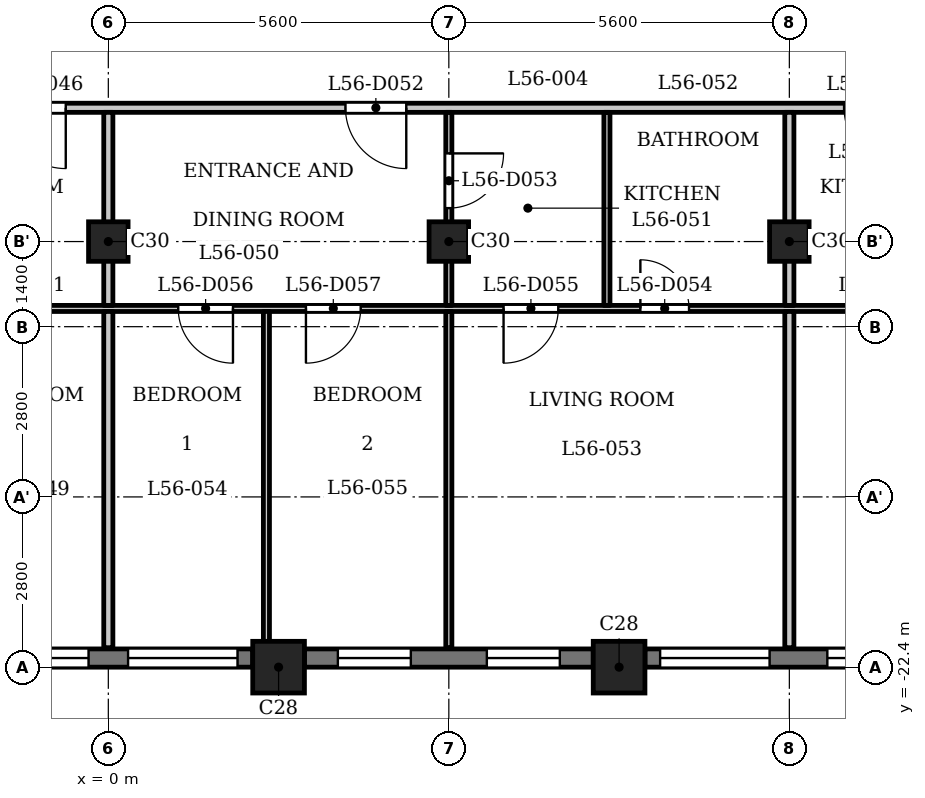
"""IFC4 building model, lengths in metres.
Left out: names, types, materials, properties, quantities, classifications, styles, units other than length and angle.
Written with IfcOpenShell. Run it as: python <this file> out.ifc"""

import sys

from ifc_helpers import new_model, si_unit, direction, frame, frame_2d, origin, origin_2d, place, context, subcontext, project, spatial, rectangle, extrude, element, fill, save


model = new_model("IFC4")
c1 = context("Model", 3, precision=1e-05, world=origin(), true_north=direction((0.0, 1.0)))
c2 = subcontext(c1, "Body", "Model", "MODEL_VIEW")
j1 = project(units=[si_unit("LENGTHUNIT", "METRE"), si_unit("PLANEANGLEUNIT", "RADIAN")], contexts=[c1])
p1 = place(None, origin())
s1 = spatial("IfcSite", under=j1, at=p1, CompositionType="ELEMENT")
p2 = place(p1, origin())
s2 = spatial("IfcBuilding", under=s1, at=p2, CompositionType="ELEMENT")
p3 = place(p2, frame((0.0, 0.0, 216.9)))
s3 = spatial("IfcBuildingStorey", under=s2, at=p3, CompositionType="ELEMENT", Elevation=216.9)
for number, where, z_axis, x_axis in (
    (1, (2.8, -22.4, 0.0), (0.0, 0.0, 1.0), (1.0, 0.0, 0.0)),
    (2, (8.4, -22.4, 0.0), (0.0, 0.0, 1.0), (1.0, 0.0, 0.0)),
):
    element("IfcColumn", number, at=place(p3, frame(where, z_axis=z_axis, x_axis=x_axis)), inside=s3, PredefinedType="COLUMN", context=c2, shape_type="SweptSolid", body=[
        extrude(rectangle(XDim=0.85, YDim=0.85, at=origin_2d()), origin(), (0.0, 0.0, 1.0), 3.5),
    ])
for number, where, z_axis, x_axis in (
    (3, (0.0, -15.4, 0.0), (0.0, 0.0, 1.0), (1.0, 0.0, 0.0)),
    (4, (5.6, -15.4, 0.0), (0.0, 0.0, 1.0), (1.0, 0.0, 0.0)),
    (5, (11.2, -15.4, 0.0), (0.0, 0.0, 1.0), (1.0, 0.0, 0.0)),
):
    element("IfcColumn", number, at=place(p3, frame(where, z_axis=z_axis, x_axis=x_axis)), inside=s3, PredefinedType="COLUMN", context=c2, shape_type="SweptSolid", body=[
        extrude(rectangle(XDim=0.65, YDim=0.65, at=origin_2d()), origin(), (0.0, 0.0, 1.0), 3.5),
    ])
p4 = place(p3, frame((-2.375, -22.25, 0.0), z_axis=(0.0, 0.0, 1.0), x_axis=(1.0, 0.0, 0.0)))
e6 = element("IfcWall", 6, at=p4, inside=s3, PredefinedType="SOLIDWALL", context=c2, shape_type="SweptSolid", body=[
    extrude(rectangle(XDim=4.75, YDim=0.3, at=frame_2d((2.375, 0.0))), origin(), (0.0, 0.0, 1.0), 2.5),
])
p5 = place(p4, frame((0.25, 0.0, 0.9)))
e7 = element("IfcOpeningElement", 7, at=p5, cuts=e6, PredefinedType="OPENING", context=c2, shape_type="SweptSolid", body=[
    extrude(rectangle(XDim=1.8, YDim=1.25, at=frame_2d((0.9, 0.625))), frame((0.0, 0.16, 0.0), z_axis=(0.0, -1.0, 0.0), x_axis=(1.0, 0.0, 0.0)), (0.0, 0.0, 1.0), 0.32),
])
p6 = place(p4, frame((2.7, 0.0, 0.9)))
e8 = element("IfcOpeningElement", 8, at=p6, cuts=e6, PredefinedType="OPENING", context=c2, shape_type="SweptSolid", body=[
    extrude(rectangle(XDim=1.8, YDim=1.25, at=frame_2d((0.9, 0.625))), frame((0.0, 0.16, 0.0), z_axis=(0.0, -1.0, 0.0), x_axis=(1.0, 0.0, 0.0)), (0.0, 0.0, 1.0), 0.32),
])
p7 = place(p3, frame((3.225, -22.25, 0.0), z_axis=(0.0, 0.0, 1.0), x_axis=(1.0, 0.0, 0.0)))
e9 = element("IfcWall", 9, at=p7, inside=s3, PredefinedType="SOLIDWALL", context=c2, shape_type="SweptSolid", body=[
    extrude(rectangle(XDim=4.75, YDim=0.3, at=frame_2d((2.375, 0.0))), origin(), (0.0, 0.0, 1.0), 2.5),
])
p8 = place(p7, frame((0.55, 0.0, 0.6)))
e10 = element("IfcOpeningElement", 10, at=p8, cuts=e9, PredefinedType="OPENING", context=c2, shape_type="SweptSolid", body=[
    extrude(rectangle(XDim=1.2, YDim=1.55, at=frame_2d((0.6, 0.775))), frame((0.0, 0.16, 0.0), z_axis=(0.0, -1.0, 0.0), x_axis=(1.0, 0.0, 0.0)), (0.0, 0.0, 1.0), 0.32),
])
p9 = place(p7, frame((3.0, 0.0, 0.6)))
e11 = element("IfcOpeningElement", 11, at=p9, cuts=e9, PredefinedType="OPENING", context=c2, shape_type="SweptSolid", body=[
    extrude(rectangle(XDim=1.2, YDim=1.55, at=frame_2d((0.6, 0.775))), frame((0.0, 0.16, 0.0), z_axis=(0.0, -1.0, 0.0), x_axis=(1.0, 0.0, 0.0)), (0.0, 0.0, 1.0), 0.32),
])
p10 = place(p3, frame((8.825, -22.25, 0.0), z_axis=(0.0, 0.0, 1.0), x_axis=(1.0, 0.0, 0.0)))
e12 = element("IfcWall", 12, at=p10, inside=s3, PredefinedType="SOLIDWALL", context=c2, shape_type="SweptSolid", body=[
    extrude(rectangle(XDim=4.75, YDim=0.3, at=frame_2d((2.375, 0.0))), origin(), (0.0, 0.0, 1.0), 2.5),
])
p11 = place(p10, frame((0.25, 0.0, 0.9)))
e13 = element("IfcOpeningElement", 13, at=p11, cuts=e12, PredefinedType="OPENING", context=c2, shape_type="SweptSolid", body=[
    extrude(rectangle(XDim=1.8, YDim=1.25, at=frame_2d((0.9, 0.625))), frame((0.0, 0.16, 0.0), z_axis=(0.0, -1.0, 0.0), x_axis=(1.0, 0.0, 0.0)), (0.0, 0.0, 1.0), 0.32),
])
p12 = place(p10, frame((3.0, 0.0, 0.6)))
e14 = element("IfcOpeningElement", 14, at=p12, cuts=e12, PredefinedType="OPENING", context=c2, shape_type="SweptSolid", body=[
    extrude(rectangle(XDim=1.2, YDim=1.55, at=frame_2d((0.6, 0.775))), frame((0.0, 0.16, 0.0), z_axis=(0.0, -1.0, 0.0), x_axis=(1.0, 0.0, 0.0)), (0.0, 0.0, 1.0), 0.32),
])
p13 = place(p3, frame((-16.725, -16.5, 0.0), z_axis=(0.0, 0.0, 1.0), x_axis=(1.0, 0.0, 0.0)))
e15 = element("IfcWall", 15, at=p13, inside=s3, PredefinedType="PARTITIONING", context=c2, shape_type="SweptSolid", body=[
    extrude(rectangle(XDim=33.45, YDim=0.1, at=frame_2d((16.725, 0.0))), origin(), (0.0, 0.0, 1.0), 3.2),
])
p14 = place(p13, frame((0.675, 0.0, 0.0)))
e16 = element("IfcOpeningElement", 16, at=p14, cuts=e15, PredefinedType="OPENING", context=c2, shape_type="SweptSolid", body=[
    extrude(rectangle(XDim=0.8, YDim=2.1, at=frame_2d((0.4, 1.05))), frame((0.0, 0.06, 0.0), z_axis=(0.0, -1.0, 0.0), x_axis=(1.0, 0.0, 0.0)), (0.0, 0.0, 1.0), 0.12),
])
p15 = place(p13, frame((2.775, 0.0, 0.0)))
e17 = element("IfcOpeningElement", 17, at=p15, cuts=e15, PredefinedType="OPENING", context=c2, shape_type="SweptSolid", body=[
    extrude(rectangle(XDim=0.9, YDim=2.1, at=frame_2d((0.45, 1.05))), frame((0.0, 0.06, 0.0), z_axis=(0.0, -1.0, 0.0), x_axis=(1.0, 0.0, 0.0)), (0.0, 0.0, 1.0), 0.12),
])
p16 = place(p13, frame((6.425, 0.0, 0.0)))
e18 = element("IfcOpeningElement", 18, at=p16, cuts=e15, PredefinedType="OPENING", context=c2, shape_type="SweptSolid", body=[
    extrude(rectangle(XDim=0.8, YDim=2.1, at=frame_2d((0.4, 1.05))), frame((0.0, 0.06, 0.0), z_axis=(0.0, -1.0, 0.0), x_axis=(1.0, 0.0, 0.0)), (0.0, 0.0, 1.0), 0.12),
])
p17 = place(p13, frame((8.775, 0.0, 0.0)))
e19 = element("IfcOpeningElement", 19, at=p17, cuts=e15, PredefinedType="OPENING", context=c2, shape_type="SweptSolid", body=[
    extrude(rectangle(XDim=0.9, YDim=2.1, at=frame_2d((0.45, 1.05))), frame((0.0, 0.06, 0.0), z_axis=(0.0, -1.0, 0.0), x_axis=(1.0, 0.0, 0.0)), (0.0, 0.0, 1.0), 0.12),
])
p18 = place(p13, frame((12.525, 0.0, 0.0)))
e20 = element("IfcOpeningElement", 20, at=p18, cuts=e15, PredefinedType="OPENING", context=c2, shape_type="SweptSolid", body=[
    extrude(rectangle(XDim=0.9, YDim=2.1, at=frame_2d((0.45, 1.05))), frame((0.0, 0.06, 0.0), z_axis=(0.0, -1.0, 0.0), x_axis=(1.0, 0.0, 0.0)), (0.0, 0.0, 1.0), 0.12),
])
p19 = place(p13, frame((14.775, 0.0, 0.0)))
e21 = element("IfcOpeningElement", 21, at=p19, cuts=e15, PredefinedType="OPENING", context=c2, shape_type="SweptSolid", body=[
    extrude(rectangle(XDim=0.9, YDim=2.1, at=frame_2d((0.45, 1.05))), frame((0.0, 0.06, 0.0), z_axis=(0.0, -1.0, 0.0), x_axis=(1.0, 0.0, 0.0)), (0.0, 0.0, 1.0), 0.12),
])
p20 = place(p13, frame((25.475, 0.0, 0.0)))
e22 = element("IfcOpeningElement", 22, at=p20, cuts=e15, PredefinedType="OPENING", context=c2, shape_type="SweptSolid", body=[
    extrude(rectangle(XDim=0.8, YDim=2.1, at=frame_2d((0.4, 1.05))), frame((0.0, 0.06, 0.0), z_axis=(0.0, -1.0, 0.0), x_axis=(1.0, 0.0, 0.0)), (0.0, 0.0, 1.0), 0.12),
])
p21 = place(p13, frame((23.225, 0.0, 0.0)))
e23 = element("IfcOpeningElement", 23, at=p21, cuts=e15, PredefinedType="OPENING", context=c2, shape_type="SweptSolid", body=[
    extrude(rectangle(XDim=0.9, YDim=2.1, at=frame_2d((0.45, 1.05))), frame((0.0, 0.06, 0.0), z_axis=(0.0, -1.0, 0.0), x_axis=(1.0, 0.0, 0.0)), (0.0, 0.0, 1.0), 0.12),
])
p22 = place(p13, frame((17.875, 0.0, 0.0)))
e24 = element("IfcOpeningElement", 24, at=p22, cuts=e15, PredefinedType="OPENING", context=c2, shape_type="SweptSolid", body=[
    extrude(rectangle(XDim=0.9, YDim=2.1, at=frame_2d((0.45, 1.05))), frame((0.0, 0.06, 0.0), z_axis=(0.0, -1.0, 0.0), x_axis=(1.0, 0.0, 0.0)), (0.0, 0.0, 1.0), 0.12),
])
p23 = place(p13, frame((19.975, 0.0, 0.0)))
e25 = element("IfcOpeningElement", 25, at=p23, cuts=e15, PredefinedType="OPENING", context=c2, shape_type="SweptSolid", body=[
    extrude(rectangle(XDim=0.9, YDim=2.1, at=frame_2d((0.45, 1.05))), frame((0.0, 0.06, 0.0), z_axis=(0.0, -1.0, 0.0), x_axis=(1.0, 0.0, 0.0)), (0.0, 0.0, 1.0), 0.12),
])
p24 = place(p13, frame((30.825, 0.0, 0.0)))
e26 = element("IfcOpeningElement", 26, at=p24, cuts=e15, PredefinedType="OPENING", context=c2, shape_type="SweptSolid", body=[
    extrude(rectangle(XDim=0.8, YDim=2.1, at=frame_2d((0.4, 1.05))), frame((0.0, 0.06, 0.0), z_axis=(0.0, -1.0, 0.0), x_axis=(1.0, 0.0, 0.0)), (0.0, 0.0, 1.0), 0.12),
])
p25 = place(p13, frame((29.075, 0.0, 0.0)))
e27 = element("IfcOpeningElement", 27, at=p25, cuts=e15, PredefinedType="OPENING", context=c2, shape_type="SweptSolid", body=[
    extrude(rectangle(XDim=0.9, YDim=2.1, at=frame_2d((0.45, 1.05))), frame((0.0, 0.06, 0.0), z_axis=(0.0, -1.0, 0.0), x_axis=(1.0, 0.0, 0.0)), (0.0, 0.0, 1.0), 0.12),
])
p26 = place(p3, frame((-17.4, -13.2, 0.0), z_axis=(0.0, 0.0, 1.0), x_axis=(1.0, 0.0, 0.0)))
e28 = element("IfcWall", 28, at=p26, inside=s3, PredefinedType="PARTITIONING", context=c2, shape_type="SweptSolid", body=[
    extrude(rectangle(XDim=34.8, YDim=0.15, at=frame_2d((17.4, 0.0))), origin(), (0.0, 0.0, 1.0), 3.2),
])
p27 = place(p26, frame((0.15, 0.0, 0.0)))
e29 = element("IfcOpeningElement", 29, at=p27, cuts=e28, PredefinedType="OPENING", context=c2, shape_type="SweptSolid", body=[
    extrude(rectangle(XDim=1.0, YDim=2.1, at=frame_2d((0.5, 1.05))), frame((0.0, 0.085, 0.0), z_axis=(0.0, -1.0, 0.0), x_axis=(1.0, 0.0, 0.0)), (0.0, 0.0, 1.0), 0.17),
])
p28 = place(p26, frame((33.55, 0.0, 0.0)))
e30 = element("IfcOpeningElement", 30, at=p28, cuts=e28, PredefinedType="OPENING", context=c2, shape_type="SweptSolid", body=[
    extrude(rectangle(XDim=1.0, YDim=2.1, at=frame_2d((0.5, 1.05))), frame((0.0, 0.085, 0.0), z_axis=(0.0, -1.0, 0.0), x_axis=(1.0, 0.0, 0.0)), (0.0, 0.0, 1.0), 0.17),
])
p29 = place(p26, frame((3.7, 0.0, 0.0)))
e31 = element("IfcOpeningElement", 31, at=p29, cuts=e28, PredefinedType="OPENING", context=c2, shape_type="SweptSolid", body=[
    extrude(rectangle(XDim=1.0, YDim=2.1, at=frame_2d((0.5, 1.05))), frame((0.0, 0.085, 0.0), z_axis=(0.0, -1.0, 0.0), x_axis=(1.0, 0.0, 0.0)), (0.0, 0.0, 1.0), 0.17),
])
p30 = place(p26, frame((15.7, 0.0, 0.0)))
e32 = element("IfcOpeningElement", 32, at=p30, cuts=e28, PredefinedType="OPENING", context=c2, shape_type="SweptSolid", body=[
    extrude(rectangle(XDim=1.0, YDim=2.1, at=frame_2d((0.5, 1.05))), frame((0.0, 0.085, 0.0), z_axis=(0.0, -1.0, 0.0), x_axis=(1.0, 0.0, 0.0)), (0.0, 0.0, 1.0), 0.17),
])
p31 = place(p26, frame((21.3, 0.0, 0.0)))
e33 = element("IfcOpeningElement", 33, at=p31, cuts=e28, PredefinedType="OPENING", context=c2, shape_type="SweptSolid", body=[
    extrude(rectangle(XDim=1.0, YDim=2.1, at=frame_2d((0.5, 1.05))), frame((0.0, 0.085, 0.0), z_axis=(0.0, -1.0, 0.0), x_axis=(1.0, 0.0, 0.0)), (0.0, 0.0, 1.0), 0.17),
])
p32 = place(p26, frame((29.5, 0.0, 0.0)))
e34 = element("IfcOpeningElement", 34, at=p32, cuts=e28, PredefinedType="OPENING", context=c2, shape_type="SweptSolid", body=[
    extrude(rectangle(XDim=1.0, YDim=2.1, at=frame_2d((0.5, 1.05))), frame((0.0, 0.085, 0.0), z_axis=(0.0, -1.0, 0.0), x_axis=(1.0, 0.0, 0.0)), (0.0, 0.0, 1.0), 0.17),
])
p33 = place(p3, frame((0.0, -22.08, 0.0), z_axis=(0.0, 0.0, 1.0), x_axis=(0.0, 1.0, 0.0)))
e35 = element("IfcWall", 35, at=p33, inside=s3, PredefinedType="PARTITIONING", context=c2, shape_type="SweptSolid", body=[
    extrude(rectangle(XDim=5.53, YDim=0.15, at=frame_2d((2.765, 0.0))), origin(), (0.0, 0.0, 1.0), 3.2),
])
p34 = place(p3, frame((0.0, -16.45, 0.0), z_axis=(0.0, 0.0, 1.0), x_axis=(0.0, 1.0, 0.0)))
e36 = element("IfcWall", 36, at=p34, inside=s3, PredefinedType="PARTITIONING", context=c2, shape_type="SweptSolid", body=[
    extrude(rectangle(XDim=3.175, YDim=0.15, at=frame_2d((1.587, 0.0))), origin(), (0.0, 0.0, 1.0), 3.2),
])
p35 = place(p3, frame((2.6, -22.805, 0.0), z_axis=(0.0, 0.0, 1.0), x_axis=(0.0, 1.0, 0.0)))
e37 = element("IfcWall", 37, at=p35, inside=s3, PredefinedType="PARTITIONING", context=c2, shape_type="SweptSolid", body=[
    extrude(rectangle(XDim=6.255, YDim=0.1, at=frame_2d((3.127, 0.0))), origin(), (0.0, 0.0, 1.0), 3.2),
])
p36 = place(p3, frame((5.6, -22.08, 0.0), z_axis=(0.0, 0.0, 1.0), x_axis=(0.0, 1.0, 0.0)))
e38 = element("IfcWall", 38, at=p36, inside=s3, PredefinedType="PARTITIONING", context=c2, shape_type="SweptSolid", body=[
    extrude(rectangle(XDim=5.53, YDim=0.1, at=frame_2d((2.765, 0.0))), origin(), (0.0, 0.0, 1.0), 3.2),
])
p37 = place(p3, frame((5.6, -16.45, 0.0), z_axis=(0.0, 0.0, 1.0), x_axis=(0.0, 1.0, 0.0)))
e39 = element("IfcWall", 39, at=p37, inside=s3, PredefinedType="PARTITIONING", context=c2, shape_type="SweptSolid", body=[
    extrude(rectangle(XDim=3.175, YDim=0.1, at=frame_2d((1.587, 0.0))), origin(), (0.0, 0.0, 1.0), 3.2),
])
p38 = place(p37, frame((1.6, 0.0, 0.0)))
e40 = element("IfcOpeningElement", 40, at=p38, cuts=e39, PredefinedType="OPENING", context=c2, shape_type="SweptSolid", body=[
    extrude(rectangle(XDim=0.9, YDim=2.1, at=frame_2d((0.45, 1.05))), frame((0.0, 0.06, 0.0), z_axis=(0.0, -1.0, 0.0), x_axis=(1.0, 0.0, 0.0)), (0.0, 0.0, 1.0), 0.12),
])
p39 = place(p3, frame((8.2, -16.45, 0.0), z_axis=(0.0, 0.0, 1.0), x_axis=(0.0, 1.0, 0.0)))
e41 = element("IfcWall", 41, at=p39, inside=s3, PredefinedType="PARTITIONING", context=c2, shape_type="SweptSolid", body=[
    extrude(rectangle(XDim=3.175, YDim=0.1, at=frame_2d((1.587, 0.0))), origin(), (0.0, 0.0, 1.0), 3.2),
])
p40 = place(p3, frame((11.2, -22.08, 0.0), z_axis=(0.0, 0.0, 1.0), x_axis=(0.0, 1.0, 0.0)))
e42 = element("IfcWall", 42, at=p40, inside=s3, PredefinedType="PARTITIONING", context=c2, shape_type="SweptSolid", body=[
    extrude(rectangle(XDim=5.53, YDim=0.15, at=frame_2d((2.765, 0.0))), origin(), (0.0, 0.0, 1.0), 3.2),
])
p41 = place(p3, frame((11.2, -16.45, 0.0), z_axis=(0.0, 0.0, 1.0), x_axis=(0.0, 1.0, 0.0)))
e43 = element("IfcWall", 43, at=p41, inside=s3, PredefinedType="PARTITIONING", context=c2, shape_type="SweptSolid", body=[
    extrude(rectangle(XDim=3.175, YDim=0.15, at=frame_2d((1.587, 0.0))), origin(), (0.0, 0.0, 1.0), 3.2),
])
p42 = place(p30, origin())
e44 = element("IfcDoor", 44, at=p42, inside=s3, OperationType="SINGLE_SWING_RIGHT", PredefinedType="DOOR", context=c2, shape_type="SweptSolid", body=[
    extrude(rectangle(XDim=1.0, YDim=2.1, at=frame_2d((0.5, 1.05))), frame((0.0, 0.025, 0.0), z_axis=(0.0, -1.0, 0.0), x_axis=(1.0, 0.0, 0.0)), (0.0, 0.0, 1.0), 0.05),
])
fill(e32, e44)
p43 = place(p31, origin())
e45 = element("IfcDoor", 45, at=p43, inside=s3, OperationType="SINGLE_SWING_RIGHT", PredefinedType="DOOR", context=c2, shape_type="SweptSolid", body=[
    extrude(rectangle(XDim=1.0, YDim=2.1, at=frame_2d((0.5, 1.05))), frame((0.0, 0.025, 0.0), z_axis=(0.0, -1.0, 0.0), x_axis=(1.0, 0.0, 0.0)), (0.0, 0.0, 1.0), 0.05),
])
fill(e33, e45)
p44 = place(p38, origin())
e46 = element("IfcDoor", 46, at=p44, inside=s3, OperationType="SINGLE_SWING_RIGHT", PredefinedType="DOOR", context=c2, shape_type="SweptSolid", body=[
    extrude(rectangle(XDim=0.9, YDim=2.1, at=frame_2d((0.45, 1.05))), frame((0.0, 0.025, 0.0), z_axis=(0.0, -1.0, 0.0), x_axis=(1.0, 0.0, 0.0)), (0.0, 0.0, 1.0), 0.05),
])
fill(e40, e46)
p45 = place(p20, origin())
e47 = element("IfcDoor", 47, at=p45, inside=s3, OperationType="SINGLE_SWING_RIGHT", PredefinedType="DOOR", context=c2, shape_type="SweptSolid", body=[
    extrude(rectangle(XDim=0.8, YDim=2.1, at=frame_2d((0.4, 1.05))), frame((0.0, 0.025, 0.0), z_axis=(0.0, -1.0, 0.0), x_axis=(1.0, 0.0, 0.0)), (0.0, 0.0, 1.0), 0.05),
])
fill(e22, e47)
p46 = place(p21, origin())
e48 = element("IfcDoor", 48, at=p46, inside=s3, OperationType="SINGLE_SWING_LEFT", PredefinedType="DOOR", context=c2, shape_type="SweptSolid", body=[
    extrude(rectangle(XDim=0.9, YDim=2.1, at=frame_2d((0.45, 1.05))), frame((0.0, 0.025, 0.0), z_axis=(0.0, -1.0, 0.0), x_axis=(1.0, 0.0, 0.0)), (0.0, 0.0, 1.0), 0.05),
])
fill(e23, e48)
p47 = place(p22, origin())
e49 = element("IfcDoor", 49, at=p47, inside=s3, OperationType="SINGLE_SWING_RIGHT", PredefinedType="DOOR", context=c2, shape_type="SweptSolid", body=[
    extrude(rectangle(XDim=0.9, YDim=2.1, at=frame_2d((0.45, 1.05))), frame((0.0, 0.025, 0.0), z_axis=(0.0, -1.0, 0.0), x_axis=(1.0, 0.0, 0.0)), (0.0, 0.0, 1.0), 0.05),
])
fill(e24, e49)
p48 = place(p23, origin())
e50 = element("IfcDoor", 50, at=p48, inside=s3, OperationType="SINGLE_SWING_LEFT", PredefinedType="DOOR", context=c2, shape_type="SweptSolid", body=[
    extrude(rectangle(XDim=0.9, YDim=2.1, at=frame_2d((0.45, 1.05))), frame((0.0, 0.025, 0.0), z_axis=(0.0, -1.0, 0.0), x_axis=(1.0, 0.0, 0.0)), (0.0, 0.0, 1.0), 0.05),
])
fill(e25, e50)
p49 = place(p32, origin())
e51 = element("IfcDoor", 51, at=p49, inside=s3, OperationType="SINGLE_SWING_RIGHT", PredefinedType="DOOR", context=c2, shape_type="SweptSolid", body=[
    extrude(rectangle(XDim=1.0, YDim=2.1, at=frame_2d((0.5, 1.05))), frame((0.0, 0.025, 0.0), z_axis=(0.0, -1.0, 0.0), x_axis=(1.0, 0.0, 0.0)), (0.0, 0.0, 1.0), 0.05),
])
fill(e34, e51)
p50 = place(p5, origin())
e52 = element("IfcWindow", 52, at=p50, inside=s3, PartitioningType="SINGLE_PANEL", PredefinedType="WINDOW", context=c2, shape_type="SweptSolid", body=[
    extrude(rectangle(XDim=1.8, YDim=1.25, at=frame_2d((0.9, 0.625))), frame((0.0, 0.03, 0.0), z_axis=(0.0, -1.0, 0.0), x_axis=(1.0, 0.0, 0.0)), (0.0, 0.0, 1.0), 0.06),
])
fill(e7, e52)
p51 = place(p6, origin())
e53 = element("IfcWindow", 53, at=p51, inside=s3, PartitioningType="SINGLE_PANEL", PredefinedType="WINDOW", context=c2, shape_type="SweptSolid", body=[
    extrude(rectangle(XDim=1.8, YDim=1.25, at=frame_2d((0.9, 0.625))), frame((0.0, 0.03, 0.0), z_axis=(0.0, -1.0, 0.0), x_axis=(1.0, 0.0, 0.0)), (0.0, 0.0, 1.0), 0.06),
])
fill(e8, e53)
p52 = place(p8, origin())
e54 = element("IfcWindow", 54, at=p52, inside=s3, PartitioningType="SINGLE_PANEL", PredefinedType="WINDOW", context=c2, shape_type="SweptSolid", body=[
    extrude(rectangle(XDim=1.2, YDim=1.55, at=frame_2d((0.6, 0.775))), frame((0.0, 0.03, 0.0), z_axis=(0.0, -1.0, 0.0), x_axis=(1.0, 0.0, 0.0)), (0.0, 0.0, 1.0), 0.06),
])
fill(e10, e54)
p53 = place(p9, origin())
e55 = element("IfcWindow", 55, at=p53, inside=s3, PartitioningType="SINGLE_PANEL", PredefinedType="WINDOW", context=c2, shape_type="SweptSolid", body=[
    extrude(rectangle(XDim=1.2, YDim=1.55, at=frame_2d((0.6, 0.775))), frame((0.0, 0.03, 0.0), z_axis=(0.0, -1.0, 0.0), x_axis=(1.0, 0.0, 0.0)), (0.0, 0.0, 1.0), 0.06),
])
fill(e11, e55)
p54 = place(p11, origin())
e56 = element("IfcWindow", 56, at=p54, inside=s3, PartitioningType="SINGLE_PANEL", PredefinedType="WINDOW", context=c2, shape_type="SweptSolid", body=[
    extrude(rectangle(XDim=1.8, YDim=1.25, at=frame_2d((0.9, 0.625))), frame((0.0, 0.03, 0.0), z_axis=(0.0, -1.0, 0.0), x_axis=(1.0, 0.0, 0.0)), (0.0, 0.0, 1.0), 0.06),
])
fill(e13, e56)
p55 = place(p12, origin())
e57 = element("IfcWindow", 57, at=p55, inside=s3, PartitioningType="SINGLE_PANEL", PredefinedType="WINDOW", context=c2, shape_type="SweptSolid", body=[
    extrude(rectangle(XDim=1.2, YDim=1.55, at=frame_2d((0.6, 0.775))), frame((0.0, 0.03, 0.0), z_axis=(0.0, -1.0, 0.0), x_axis=(1.0, 0.0, 0.0)), (0.0, 0.0, 1.0), 0.06),
])
fill(e14, e57)
save(model, sys.argv[1])
